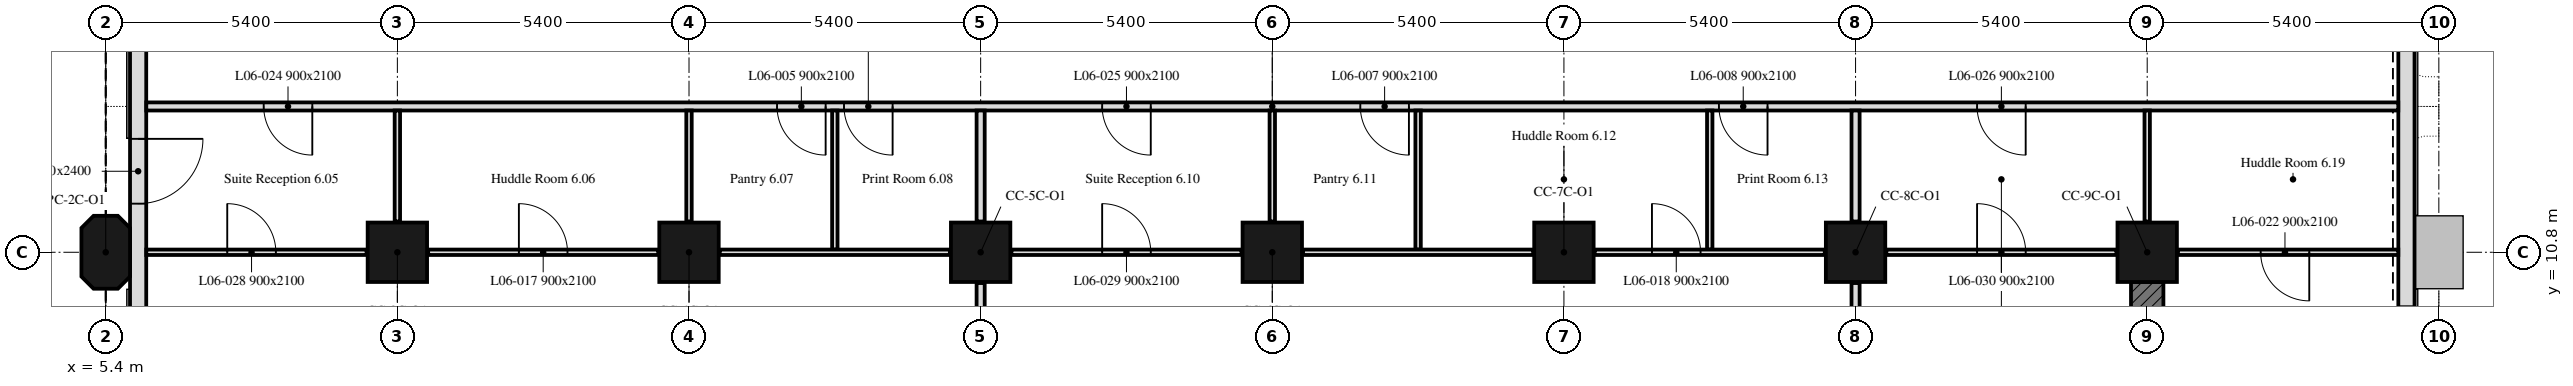
"""IFC4 building model, lengths in metres.
Left out: names, types, materials, properties, quantities, classifications, styles, units other than length and angle.
Written with IfcOpenShell. Run it as: python <this file> out.ifc"""

import sys

from ifc_helpers import new_model, si_unit, direction, frame, frame_2d, origin, origin_2d, place, context, subcontext, project, spatial, polyline, rectangle, outline, extrude, element, fill, save


model = new_model("IFC4")
c1 = context("Model", 3, precision=1e-05, world=origin(), true_north=direction((0.0, 1.0)))
c2 = subcontext(c1, "Body", "Model", "MODEL_VIEW")
j1 = project(units=[si_unit("LENGTHUNIT", "METRE"), si_unit("PLANEANGLEUNIT", "RADIAN")], contexts=[c1])
p1 = place(None, origin())
s1 = spatial("IfcSite", under=j1, at=p1, CompositionType="ELEMENT")
p2 = place(p1, origin())
s2 = spatial("IfcBuilding", under=s1, at=p2, CompositionType="ELEMENT")
p3 = place(p2, frame((0.0, 0.0, 33.6)))
s3 = spatial("IfcBuildingStorey", under=s2, at=p3, CompositionType="ELEMENT", Elevation=33.6)
p4 = place(p3, frame((5.4, 10.8, 0.0), z_axis=(0.0, 0.0, 1.0), x_axis=(0.0, 1.0, 0.0)))
e1 = element("IfcColumn", 1, at=p4, inside=s3, PredefinedType="COLUMN", context=c2, shape_type="SweptSolid", body=[
    extrude(outline(polyline([(-0.45, -0.45), (0.45, -0.45), (0.675, -0.225), (0.675, 0.225), (0.45, 0.45), (-0.45, 0.45), (-0.675, 0.225), (-0.675, -0.225), (-0.45, -0.45)])), origin(), (0.0, 0.0, 1.0), 3.5),
])
for number, where, z_axis, x_axis in (
    (2, (10.8, 10.8, 0.0), (0.0, 0.0, 1.0), (1.0, 0.0, 0.0)),
    (3, (16.2, 10.8, 0.0), (0.0, 0.0, 1.0), (1.0, 0.0, 0.0)),
    (4, (21.6, 10.8, 0.0), (0.0, 0.0, 1.0), (1.0, 0.0, 0.0)),
    (5, (27.0, 10.8, 0.0), (0.0, 0.0, 1.0), (1.0, 0.0, 0.0)),
    (6, (32.4, 10.8, 0.0), (0.0, 0.0, 1.0), (1.0, 0.0, 0.0)),
    (7, (37.8, 10.8, 0.0), (0.0, 0.0, 1.0), (1.0, 0.0, 0.0)),
    (8, (43.2, 10.8, 0.0), (0.0, 0.0, 1.0), (1.0, 0.0, 0.0)),
):
    element("IfcColumn", number, at=place(p3, frame(where, z_axis=z_axis, x_axis=x_axis)), inside=s3, PredefinedType="COLUMN", context=c2, shape_type="SweptSolid", body=[
        extrude(rectangle(XDim=1.1, YDim=1.1, at=origin_2d()), origin(), (0.0, 0.0, 1.0), 3.5),
    ])
p5 = place(p3, frame((43.2, 8.85, 0.0), z_axis=(0.0, 0.0, 1.0), x_axis=(0.0, 1.0, 0.0)))
e9 = element("IfcWall", 9, at=p5, inside=s3, PredefinedType="SHEAR", context=c2, shape_type="SweptSolid", body=[
    extrude(rectangle(XDim=1.4, YDim=0.6, at=frame_2d((0.7, 0.0))), origin(), (0.0, 0.0, 1.0), 3.5),
])
p6 = place(p3, frame((48.0, 5.586, 0.0), z_axis=(0.0, 0.0, 1.0), x_axis=(0.0, 1.0, 0.0)))
e10 = element("IfcWall", 10, at=p6, inside=s3, PredefinedType="SOLIDWALL", context=c2, shape_type="SweptSolid", body=[
    extrude(rectangle(XDim=32.027, YDim=0.3, at=frame_2d((16.014, 0.0))), origin(), (0.0, 0.0, 1.0), 3.5),
])
p7 = place(p6, frame((0.814, 0.0, 0.9)))
e11 = element("IfcOpeningElement", 11, at=p7, cuts=e10, PredefinedType="OPENING", context=c2, shape_type="SweptSolid", body=[
    extrude(rectangle(XDim=3.4, YDim=1.7, at=frame_2d((1.7, 0.85))), frame((0.0, 0.16, 0.0), z_axis=(0.0, -1.0, 0.0), x_axis=(1.0, 0.0, 0.0)), (0.0, 0.0, 1.0), 0.32),
])
p8 = place(p3, frame((6.0, 16.2, 0.0), z_axis=(0.0, 0.0, 1.0), x_axis=(0.0, -1.0, 0.0)))
e12 = element("IfcWall", 12, at=p8, inside=s3, PredefinedType="SOLIDWALL", context=c2, shape_type="SweptSolid", body=[
    extrude(rectangle(XDim=10.614, YDim=0.3, at=frame_2d((5.307, 0.0))), origin(), (0.0, 0.0, 1.0), 3.5),
])
p9 = place(p8, frame((3.3, 0.0, 0.0)))
e13 = element("IfcOpeningElement", 13, at=p9, cuts=e12, PredefinedType="OPENING", context=c2, shape_type="SweptSolid", body=[
    extrude(rectangle(XDim=1.2, YDim=2.4, at=frame_2d((0.6, 1.2))), frame((0.0, 0.16, 0.0), z_axis=(0.0, -1.0, 0.0), x_axis=(1.0, 0.0, 0.0)), (0.0, 0.0, 1.0), 0.32),
])
p10 = place(p8, frame((7.2, 0.0, 0.0)))
e14 = element("IfcOpeningElement", 14, at=p10, cuts=e12, PredefinedType="OPENING", context=c2, shape_type="SweptSolid", body=[
    extrude(rectangle(XDim=1.8, YDim=2.4, at=frame_2d((0.9, 1.2))), frame((0.0, 0.16, 0.0), z_axis=(0.0, -1.0, 0.0), x_axis=(1.0, 0.0, 0.0)), (0.0, 0.0, 1.0), 0.32),
])
p11 = place(p3, frame((47.849, 13.5, 0.0), z_axis=(0.0, 0.0, 1.0), x_axis=(-1.0, 0.0, 0.0)))
e15 = element("IfcWall", 15, at=p11, inside=s3, PredefinedType="PARTITIONING", context=c2, shape_type="SweptSolid", body=[
    extrude(rectangle(XDim=41.698, YDim=0.15, at=frame_2d((20.849, 0.0))), origin(), (0.0, 0.0, 1.0), 2.75),
])
p12 = place(p11, frame((29.119, 0.0, 0.0)))
e16 = element("IfcOpeningElement", 16, at=p12, cuts=e15, PredefinedType="OPENING", context=c2, shape_type="SweptSolid", body=[
    extrude(rectangle(XDim=0.9, YDim=2.1, at=frame_2d((0.45, 1.05))), frame((0.0, 0.075, 0.0), z_axis=(0.0, -1.0, 0.0), x_axis=(1.0, 0.0, 0.0)), (0.0, 0.0, 1.0), 0.15),
])
p13 = place(p11, frame((27.879, 0.0, 0.0)))
e17 = element("IfcOpeningElement", 17, at=p13, cuts=e15, PredefinedType="OPENING", context=c2, shape_type="SweptSolid", body=[
    extrude(rectangle(XDim=0.9, YDim=2.1, at=frame_2d((0.45, 1.05))), frame((0.0, 0.075, 0.0), z_axis=(0.0, -1.0, 0.0), x_axis=(1.0, 0.0, 0.0)), (0.0, 0.0, 1.0), 0.15),
])
p14 = place(p11, frame((18.319, 0.0, 0.0)))
e18 = element("IfcOpeningElement", 18, at=p14, cuts=e15, PredefinedType="OPENING", context=c2, shape_type="SweptSolid", body=[
    extrude(rectangle(XDim=0.9, YDim=2.1, at=frame_2d((0.45, 1.05))), frame((0.0, 0.075, 0.0), z_axis=(0.0, -1.0, 0.0), x_axis=(1.0, 0.0, 0.0)), (0.0, 0.0, 1.0), 0.15),
])
p15 = place(p11, frame((11.679, 0.0, 0.0)))
e19 = element("IfcOpeningElement", 19, at=p15, cuts=e15, PredefinedType="OPENING", context=c2, shape_type="SweptSolid", body=[
    extrude(rectangle(XDim=0.9, YDim=2.1, at=frame_2d((0.45, 1.05))), frame((0.0, 0.075, 0.0), z_axis=(0.0, -1.0, 0.0), x_axis=(1.0, 0.0, 0.0)), (0.0, 0.0, 1.0), 0.15),
])
p16 = place(p11, frame((38.624, 0.0, 0.0)))
e20 = element("IfcOpeningElement", 20, at=p16, cuts=e15, PredefinedType="OPENING", context=c2, shape_type="SweptSolid", body=[
    extrude(rectangle(XDim=0.9, YDim=2.1, at=frame_2d((0.45, 1.05))), frame((0.0, 0.075, 0.0), z_axis=(0.0, -1.0, 0.0), x_axis=(1.0, 0.0, 0.0)), (0.0, 0.0, 1.0), 0.15),
])
p17 = place(p11, frame((23.099, 0.0, 0.0)))
e21 = element("IfcOpeningElement", 21, at=p17, cuts=e15, PredefinedType="OPENING", context=c2, shape_type="SweptSolid", body=[
    extrude(rectangle(XDim=0.9, YDim=2.1, at=frame_2d((0.45, 1.05))), frame((0.0, 0.075, 0.0), z_axis=(0.0, -1.0, 0.0), x_axis=(1.0, 0.0, 0.0)), (0.0, 0.0, 1.0), 0.15),
])
p18 = place(p11, frame((6.899, 0.0, 0.0)))
e22 = element("IfcOpeningElement", 22, at=p18, cuts=e15, PredefinedType="OPENING", context=c2, shape_type="SweptSolid", body=[
    extrude(rectangle(XDim=0.9, YDim=2.1, at=frame_2d((0.45, 1.05))), frame((0.0, 0.075, 0.0), z_axis=(0.0, -1.0, 0.0), x_axis=(1.0, 0.0, 0.0)), (0.0, 0.0, 1.0), 0.15),
])
p19 = place(p3, frame((6.151, 10.8, 0.0), z_axis=(0.0, 0.0, 1.0), x_axis=(1.0, 0.0, 0.0)))
e23 = element("IfcWall", 23, at=p19, inside=s3, PredefinedType="PARTITIONING", context=c2, shape_type="SweptSolid", body=[
    extrude(rectangle(XDim=4.079, YDim=0.1, at=frame_2d((2.04, 0.0))), origin(), (0.0, 0.0, 1.0), 3.5),
])
p20 = place(p19, frame((1.499, 0.0, 0.0)))
e24 = element("IfcOpeningElement", 24, at=p20, cuts=e23, PredefinedType="OPENING", context=c2, shape_type="SweptSolid", body=[
    extrude(rectangle(XDim=0.9, YDim=2.1, at=frame_2d((0.45, 1.05))), frame((0.0, 0.05, 0.0), z_axis=(0.0, -1.0, 0.0), x_axis=(1.0, 0.0, 0.0)), (0.0, 0.0, 1.0), 0.1),
])
p21 = place(p3, frame((10.8, 11.37, 0.0), z_axis=(0.0, 0.0, 1.0), x_axis=(0.0, 1.0, 0.0)))
e25 = element("IfcWall", 25, at=p21, inside=s3, PredefinedType="PARTITIONING", context=c2, shape_type="SweptSolid", body=[
    extrude(rectangle(XDim=2.055, YDim=0.1, at=frame_2d((1.027, 0.0))), origin(), (0.0, 0.0, 1.0), 3.5),
])
p22 = place(p3, frame((11.37, 10.8, 0.0), z_axis=(0.0, 0.0, 1.0), x_axis=(1.0, 0.0, 0.0)))
e26 = element("IfcWall", 26, at=p22, inside=s3, PredefinedType="PARTITIONING", context=c2, shape_type="SweptSolid", body=[
    extrude(rectangle(XDim=4.26, YDim=0.1, at=frame_2d((2.13, 0.0))), origin(), (0.0, 0.0, 1.0), 3.5),
])
p23 = place(p22, frame((1.68, 0.0, 0.0)))
e27 = element("IfcOpeningElement", 27, at=p23, cuts=e26, PredefinedType="OPENING", context=c2, shape_type="SweptSolid", body=[
    extrude(rectangle(XDim=0.9, YDim=2.1, at=frame_2d((0.45, 1.05))), frame((0.0, 0.05, 0.0), z_axis=(0.0, -1.0, 0.0), x_axis=(1.0, 0.0, 0.0)), (0.0, 0.0, 1.0), 0.1),
])
p24 = place(p3, frame((16.2, 11.37, 0.0), z_axis=(0.0, 0.0, 1.0), x_axis=(0.0, 1.0, 0.0)))
e28 = element("IfcWall", 28, at=p24, inside=s3, PredefinedType="PARTITIONING", context=c2, shape_type="SweptSolid", body=[
    extrude(rectangle(XDim=2.055, YDim=0.1, at=frame_2d((1.027, 0.0))), origin(), (0.0, 0.0, 1.0), 2.75),
])
p25 = place(p3, frame((18.9, 10.85, 0.0), z_axis=(0.0, 0.0, 1.0), x_axis=(0.0, 1.0, 0.0)))
e29 = element("IfcWall", 29, at=p25, inside=s3, PredefinedType="PARTITIONING", context=c2, shape_type="SweptSolid", body=[
    extrude(rectangle(XDim=2.575, YDim=0.1, at=frame_2d((1.288, 0.0))), origin(), (0.0, 0.0, 1.0), 3.5),
])
p26 = place(p3, frame((16.77, 10.8, 0.0), z_axis=(0.0, 0.0, 1.0), x_axis=(1.0, 0.0, 0.0)))
e30 = element("IfcWall", 30, at=p26, inside=s3, PredefinedType="PARTITIONING", context=c2, shape_type="SweptSolid", body=[
    extrude(rectangle(XDim=4.26, YDim=0.1, at=frame_2d((2.13, 0.0))), origin(), (0.0, 0.0, 1.0), 3.5),
])
p27 = place(p3, frame((21.6, 11.37, 0.0), z_axis=(0.0, 0.0, 1.0), x_axis=(0.0, 1.0, 0.0)))
e31 = element("IfcWall", 31, at=p27, inside=s3, PredefinedType="PARTITIONING", context=c2, shape_type="SweptSolid", body=[
    extrude(rectangle(XDim=2.055, YDim=0.15, at=frame_2d((1.027, 0.0))), origin(), (0.0, 0.0, 1.0), 2.75),
])
p28 = place(p3, frame((21.6, 10.23, 0.0), z_axis=(0.0, 0.0, 1.0), x_axis=(0.0, -1.0, 0.0)))
e32 = element("IfcWall", 32, at=p28, inside=s3, PredefinedType="PARTITIONING", context=c2, shape_type="SweptSolid", body=[
    extrude(rectangle(XDim=4.26, YDim=0.15, at=frame_2d((2.13, 0.0))), origin(), (0.0, 0.0, 1.0), 2.75),
])
p29 = place(p3, frame((22.17, 10.8, 0.0), z_axis=(0.0, 0.0, 1.0), x_axis=(1.0, 0.0, 0.0)))
e33 = element("IfcWall", 33, at=p29, inside=s3, PredefinedType="PARTITIONING", context=c2, shape_type="SweptSolid", body=[
    extrude(rectangle(XDim=4.26, YDim=0.1, at=frame_2d((2.13, 0.0))), origin(), (0.0, 0.0, 1.0), 3.5),
])
p30 = place(p29, frame((1.68, 0.0, 0.0)))
e34 = element("IfcOpeningElement", 34, at=p30, cuts=e33, PredefinedType="OPENING", context=c2, shape_type="SweptSolid", body=[
    extrude(rectangle(XDim=0.9, YDim=2.1, at=frame_2d((0.45, 1.05))), frame((0.0, 0.05, 0.0), z_axis=(0.0, -1.0, 0.0), x_axis=(1.0, 0.0, 0.0)), (0.0, 0.0, 1.0), 0.1),
])
p31 = place(p3, frame((27.0, 11.37, 0.0), z_axis=(0.0, 0.0, 1.0), x_axis=(0.0, 1.0, 0.0)))
e35 = element("IfcWall", 35, at=p31, inside=s3, PredefinedType="PARTITIONING", context=c2, shape_type="SweptSolid", body=[
    extrude(rectangle(XDim=2.055, YDim=0.1, at=frame_2d((1.027, 0.0))), origin(), (0.0, 0.0, 1.0), 2.75),
])
p32 = place(p3, frame((29.7, 10.85, 0.0), z_axis=(0.0, 0.0, 1.0), x_axis=(0.0, 1.0, 0.0)))
e36 = element("IfcWall", 36, at=p32, inside=s3, PredefinedType="PARTITIONING", context=c2, shape_type="SweptSolid", body=[
    extrude(rectangle(XDim=2.575, YDim=0.1, at=frame_2d((1.288, 0.0))), origin(), (0.0, 0.0, 1.0), 3.5),
])
p33 = place(p3, frame((27.57, 10.8, 0.0), z_axis=(0.0, 0.0, 1.0), x_axis=(1.0, 0.0, 0.0)))
e37 = element("IfcWall", 37, at=p33, inside=s3, PredefinedType="PARTITIONING", context=c2, shape_type="SweptSolid", body=[
    extrude(rectangle(XDim=4.26, YDim=0.1, at=frame_2d((2.13, 0.0))), origin(), (0.0, 0.0, 1.0), 3.5),
])
p34 = place(p3, frame((35.1, 10.85, 0.0), z_axis=(0.0, 0.0, 1.0), x_axis=(0.0, 1.0, 0.0)))
e38 = element("IfcWall", 38, at=p34, inside=s3, PredefinedType="PARTITIONING", context=c2, shape_type="SweptSolid", body=[
    extrude(rectangle(XDim=2.575, YDim=0.1, at=frame_2d((1.288, 0.0))), origin(), (0.0, 0.0, 1.0), 3.5),
])
p35 = place(p3, frame((32.97, 10.8, 0.0), z_axis=(0.0, 0.0, 1.0), x_axis=(1.0, 0.0, 0.0)))
e39 = element("IfcWall", 39, at=p35, inside=s3, PredefinedType="PARTITIONING", context=c2, shape_type="SweptSolid", body=[
    extrude(rectangle(XDim=4.26, YDim=0.1, at=frame_2d((2.13, 0.0))), origin(), (0.0, 0.0, 1.0), 2.75),
])
p36 = place(p35, frame((1.06, 0.0, 0.0)))
e40 = element("IfcOpeningElement", 40, at=p36, cuts=e39, PredefinedType="OPENING", context=c2, shape_type="SweptSolid", body=[
    extrude(rectangle(XDim=0.9, YDim=2.1, at=frame_2d((0.45, 1.05))), frame((0.0, 0.05, 0.0), z_axis=(0.0, -1.0, 0.0), x_axis=(1.0, 0.0, 0.0)), (0.0, 0.0, 1.0), 0.1),
])
p37 = place(p3, frame((37.8, 11.37, 0.0), z_axis=(0.0, 0.0, 1.0), x_axis=(0.0, 1.0, 0.0)))
e41 = element("IfcWall", 41, at=p37, inside=s3, PredefinedType="PARTITIONING", context=c2, shape_type="SweptSolid", body=[
    extrude(rectangle(XDim=2.055, YDim=0.15, at=frame_2d((1.027, 0.0))), origin(), (0.0, 0.0, 1.0), 2.75),
])
p38 = place(p3, frame((37.8, 5.97, 0.0), z_axis=(0.0, 0.0, 1.0), x_axis=(0.0, 1.0, 0.0)))
e42 = element("IfcWall", 42, at=p38, inside=s3, PredefinedType="PARTITIONING", context=c2, shape_type="SweptSolid", body=[
    extrude(rectangle(XDim=4.26, YDim=0.15, at=frame_2d((2.13, 0.0))), origin(), (0.0, 0.0, 1.0), 2.75),
])
p39 = place(p3, frame((38.37, 10.8, 0.0), z_axis=(0.0, 0.0, 1.0), x_axis=(1.0, 0.0, 0.0)))
e43 = element("IfcWall", 43, at=p39, inside=s3, PredefinedType="PARTITIONING", context=c2, shape_type="SweptSolid", body=[
    extrude(rectangle(XDim=4.26, YDim=0.1, at=frame_2d((2.13, 0.0))), origin(), (0.0, 0.0, 1.0), 2.75),
])
p40 = place(p39, frame((1.68, 0.0, 0.0)))
e44 = element("IfcOpeningElement", 44, at=p40, cuts=e43, PredefinedType="OPENING", context=c2, shape_type="SweptSolid", body=[
    extrude(rectangle(XDim=0.9, YDim=2.1, at=frame_2d((0.45, 1.05))), frame((0.0, 0.05, 0.0), z_axis=(0.0, -1.0, 0.0), x_axis=(1.0, 0.0, 0.0)), (0.0, 0.0, 1.0), 0.1),
])
p41 = place(p3, frame((43.2, 11.37, 0.0), z_axis=(0.0, 0.0, 1.0), x_axis=(0.0, 1.0, 0.0)))
e45 = element("IfcWall", 45, at=p41, inside=s3, PredefinedType="PARTITIONING", context=c2, shape_type="SweptSolid", body=[
    extrude(rectangle(XDim=2.055, YDim=0.1, at=frame_2d((1.027, 0.0))), origin(), (0.0, 0.0, 1.0), 3.5),
])
p42 = place(p3, frame((47.849, 10.8, 0.0), z_axis=(0.0, 0.0, 1.0), x_axis=(-1.0, 0.0, 0.0)))
e46 = element("IfcWall", 46, at=p42, inside=s3, PredefinedType="PARTITIONING", context=c2, shape_type="SweptSolid", body=[
    extrude(rectangle(XDim=4.079, YDim=0.1, at=frame_2d((2.04, 0.0))), origin(), (0.0, 0.0, 1.0), 2.75),
])
p43 = place(p42, frame((1.648, 0.0, 0.0)))
e47 = element("IfcOpeningElement", 47, at=p43, cuts=e46, PredefinedType="OPENING", context=c2, shape_type="SweptSolid", body=[
    extrude(rectangle(XDim=0.9, YDim=2.1, at=frame_2d((0.45, 1.05))), frame((0.0, 0.05, 0.0), z_axis=(0.0, -1.0, 0.0), x_axis=(1.0, 0.0, 0.0)), (0.0, 0.0, 1.0), 0.1),
])
p44 = place(p9, origin())
e48 = element("IfcDoor", 48, at=p44, inside=s3, OperationType="SINGLE_SWING_LEFT", PredefinedType="DOOR", context=c2, shape_type="SweptSolid", body=[
    extrude(rectangle(XDim=1.2, YDim=2.4, at=frame_2d((0.6, 1.2))), frame((0.0, 0.025, 0.0), z_axis=(0.0, -1.0, 0.0), x_axis=(1.0, 0.0, 0.0)), (0.0, 0.0, 1.0), 0.05),
])
fill(e13, e48)
p45 = place(p12, origin())
e49 = element("IfcDoor", 49, at=p45, inside=s3, OperationType="SINGLE_SWING_LEFT", PredefinedType="DOOR", context=c2, shape_type="SweptSolid", body=[
    extrude(rectangle(XDim=0.9, YDim=2.1, at=frame_2d((0.45, 1.05))), frame((0.0, 0.025, 0.0), z_axis=(0.0, -1.0, 0.0), x_axis=(1.0, 0.0, 0.0)), (0.0, 0.0, 1.0), 0.05),
])
fill(e16, e49)
p46 = place(p13, origin())
e50 = element("IfcDoor", 50, at=p46, inside=s3, OperationType="SINGLE_SWING_LEFT", PredefinedType="DOOR", context=c2, shape_type="SweptSolid", body=[
    extrude(rectangle(XDim=0.9, YDim=2.1, at=frame_2d((0.45, 1.05))), frame((0.0, 0.025, 0.0), z_axis=(0.0, -1.0, 0.0), x_axis=(1.0, 0.0, 0.0)), (0.0, 0.0, 1.0), 0.05),
])
fill(e17, e50)
p47 = place(p14, origin())
e51 = element("IfcDoor", 51, at=p47, inside=s3, OperationType="SINGLE_SWING_LEFT", PredefinedType="DOOR", context=c2, shape_type="SweptSolid", body=[
    extrude(rectangle(XDim=0.9, YDim=2.1, at=frame_2d((0.45, 1.05))), frame((0.0, 0.025, 0.0), z_axis=(0.0, -1.0, 0.0), x_axis=(1.0, 0.0, 0.0)), (0.0, 0.0, 1.0), 0.05),
])
fill(e18, e51)
p48 = place(p15, origin())
e52 = element("IfcDoor", 52, at=p48, inside=s3, OperationType="SINGLE_SWING_LEFT", PredefinedType="DOOR", context=c2, shape_type="SweptSolid", body=[
    extrude(rectangle(XDim=0.9, YDim=2.1, at=frame_2d((0.45, 1.05))), frame((0.0, 0.025, 0.0), z_axis=(0.0, -1.0, 0.0), x_axis=(1.0, 0.0, 0.0)), (0.0, 0.0, 1.0), 0.05),
])
fill(e19, e52)
p49 = place(p23, origin())
e53 = element("IfcDoor", 53, at=p49, inside=s3, OperationType="SINGLE_SWING_LEFT", PredefinedType="DOOR", context=c2, shape_type="SweptSolid", body=[
    extrude(rectangle(XDim=0.9, YDim=2.1, at=frame_2d((0.45, 1.05))), frame((0.0, 0.025, 0.0), z_axis=(0.0, -1.0, 0.0), x_axis=(1.0, 0.0, 0.0)), (0.0, 0.0, 1.0), 0.05),
])
fill(e27, e53)
p50 = place(p36, origin())
e54 = element("IfcDoor", 54, at=p50, inside=s3, OperationType="SINGLE_SWING_LEFT", PredefinedType="DOOR", context=c2, shape_type="SweptSolid", body=[
    extrude(rectangle(XDim=0.9, YDim=2.1, at=frame_2d((0.45, 1.05))), frame((0.0, 0.025, 0.0), z_axis=(0.0, -1.0, 0.0), x_axis=(1.0, 0.0, 0.0)), (0.0, 0.0, 1.0), 0.05),
])
fill(e40, e54)
p51 = place(p43, origin())
e55 = element("IfcDoor", 55, at=p51, inside=s3, OperationType="SINGLE_SWING_RIGHT", PredefinedType="DOOR", context=c2, shape_type="SweptSolid", body=[
    extrude(rectangle(XDim=0.9, YDim=2.1, at=frame_2d((0.45, 1.05))), frame((0.0, 0.025, 0.0), z_axis=(0.0, -1.0, 0.0), x_axis=(1.0, 0.0, 0.0)), (0.0, 0.0, 1.0), 0.05),
])
fill(e47, e55)
p52 = place(p16, origin())
e56 = element("IfcDoor", 56, at=p52, inside=s3, OperationType="SINGLE_SWING_LEFT", PredefinedType="DOOR", context=c2, shape_type="SweptSolid", body=[
    extrude(rectangle(XDim=0.9, YDim=2.1, at=frame_2d((0.45, 1.05))), frame((0.0, 0.025, 0.0), z_axis=(0.0, -1.0, 0.0), x_axis=(1.0, 0.0, 0.0)), (0.0, 0.0, 1.0), 0.05),
])
fill(e20, e56)
p53 = place(p17, origin())
e57 = element("IfcDoor", 57, at=p53, inside=s3, OperationType="SINGLE_SWING_LEFT", PredefinedType="DOOR", context=c2, shape_type="SweptSolid", body=[
    extrude(rectangle(XDim=0.9, YDim=2.1, at=frame_2d((0.45, 1.05))), frame((0.0, 0.025, 0.0), z_axis=(0.0, -1.0, 0.0), x_axis=(1.0, 0.0, 0.0)), (0.0, 0.0, 1.0), 0.05),
])
fill(e21, e57)
p54 = place(p18, origin())
e58 = element("IfcDoor", 58, at=p54, inside=s3, OperationType="SINGLE_SWING_LEFT", PredefinedType="DOOR", context=c2, shape_type="SweptSolid", body=[
    extrude(rectangle(XDim=0.9, YDim=2.1, at=frame_2d((0.45, 1.05))), frame((0.0, 0.025, 0.0), z_axis=(0.0, -1.0, 0.0), x_axis=(1.0, 0.0, 0.0)), (0.0, 0.0, 1.0), 0.05),
])
fill(e22, e58)
p55 = place(p20, origin())
e59 = element("IfcDoor", 59, at=p55, inside=s3, OperationType="SINGLE_SWING_RIGHT", PredefinedType="DOOR", context=c2, shape_type="SweptSolid", body=[
    extrude(rectangle(XDim=0.9, YDim=2.1, at=frame_2d((0.45, 1.05))), frame((0.0, 0.025, 0.0), z_axis=(0.0, -1.0, 0.0), x_axis=(1.0, 0.0, 0.0)), (0.0, 0.0, 1.0), 0.05),
])
fill(e24, e59)
p56 = place(p30, origin())
e60 = element("IfcDoor", 60, at=p56, inside=s3, OperationType="SINGLE_SWING_RIGHT", PredefinedType="DOOR", context=c2, shape_type="SweptSolid", body=[
    extrude(rectangle(XDim=0.9, YDim=2.1, at=frame_2d((0.45, 1.05))), frame((0.0, 0.025, 0.0), z_axis=(0.0, -1.0, 0.0), x_axis=(1.0, 0.0, 0.0)), (0.0, 0.0, 1.0), 0.05),
])
fill(e34, e60)
p57 = place(p40, origin())
e61 = element("IfcDoor", 61, at=p57, inside=s3, OperationType="SINGLE_SWING_LEFT", PredefinedType="DOOR", context=c2, shape_type="SweptSolid", body=[
    extrude(rectangle(XDim=0.9, YDim=2.1, at=frame_2d((0.45, 1.05))), frame((0.0, 0.025, 0.0), z_axis=(0.0, -1.0, 0.0), x_axis=(1.0, 0.0, 0.0)), (0.0, 0.0, 1.0), 0.05),
])
fill(e44, e61)
save(model, sys.argv[1])
